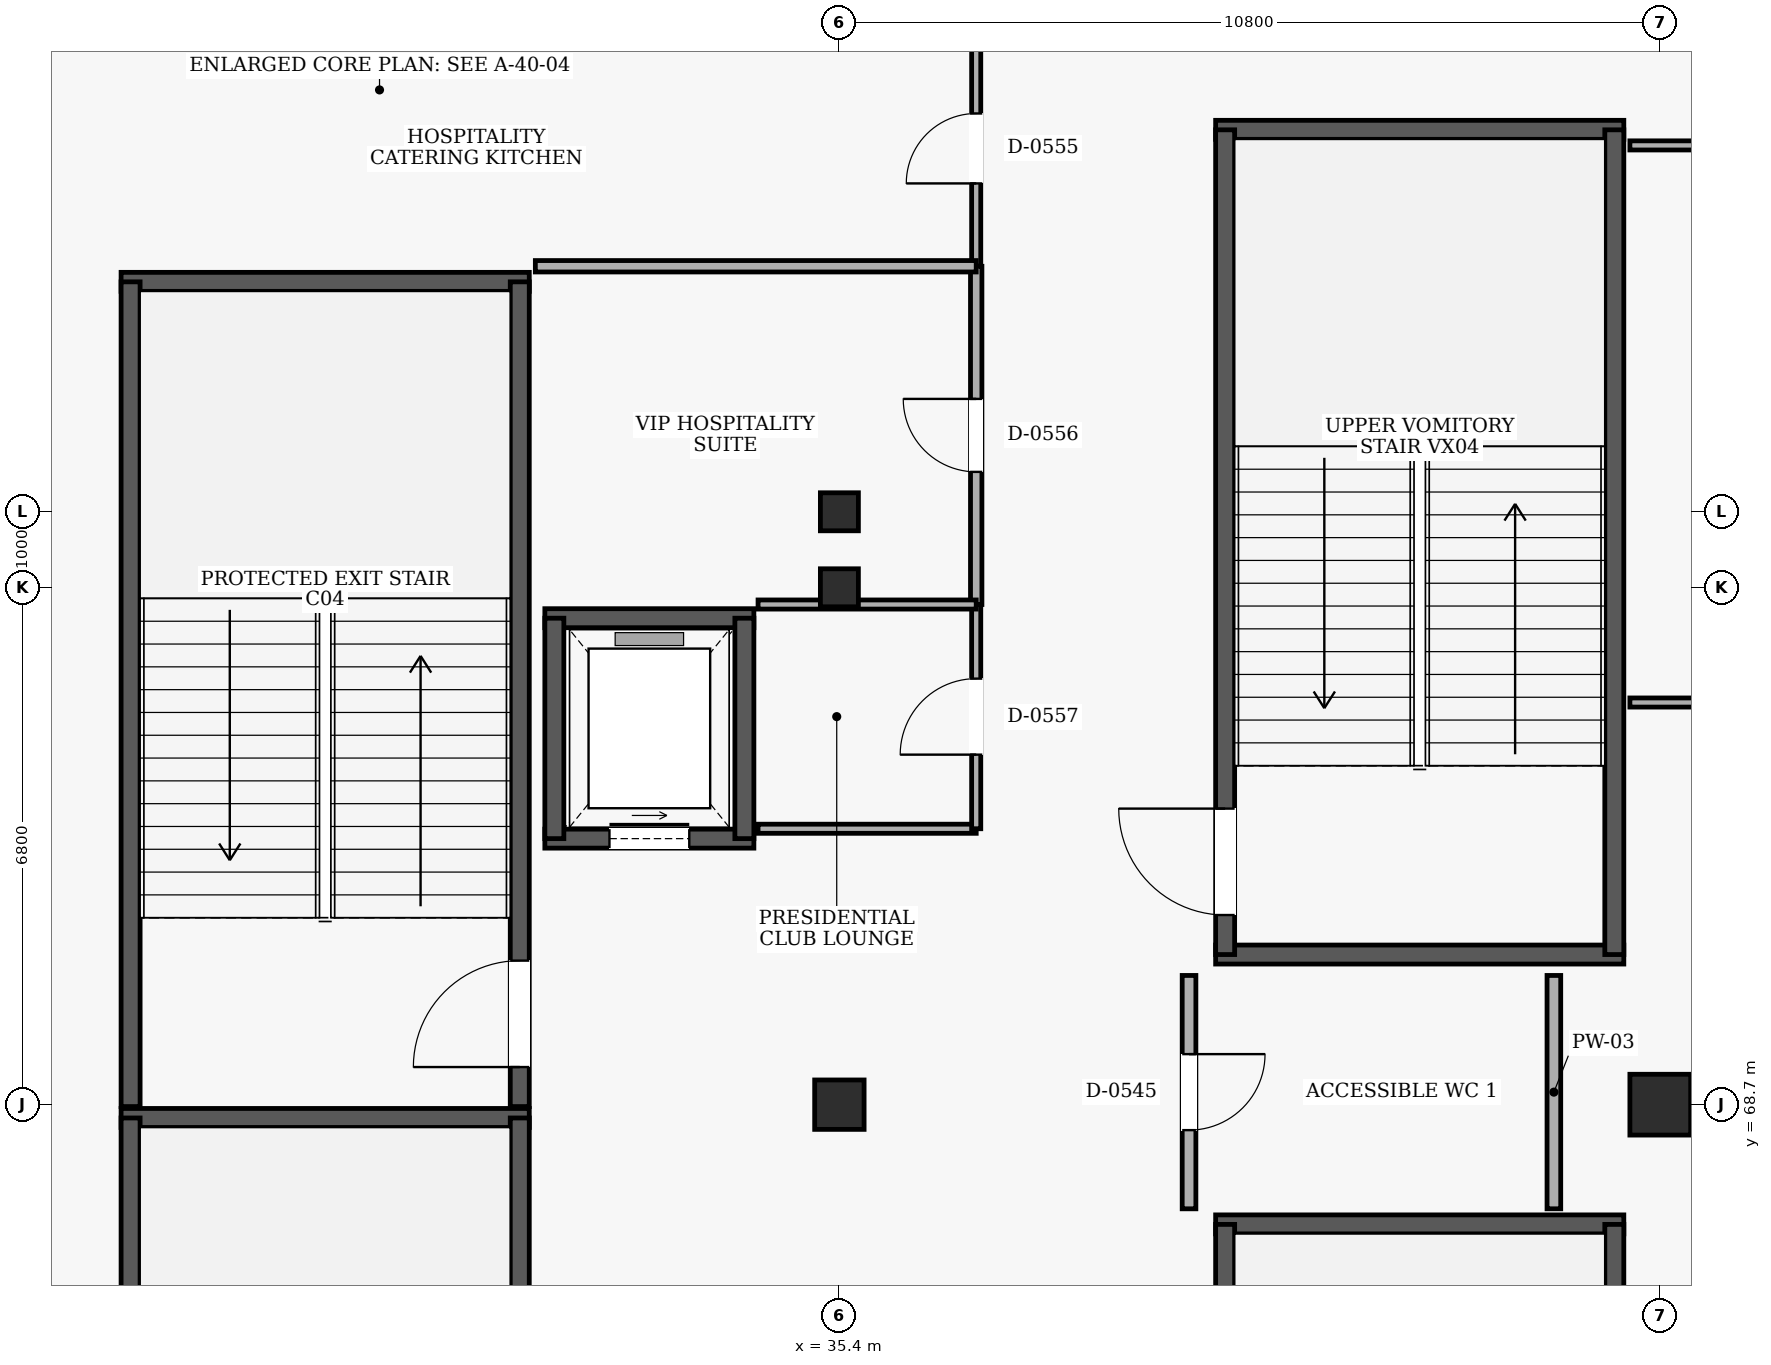
"""IFC4 building model, lengths in metres.
Left out: names, types, materials, properties, quantities, classifications, styles, units other than length and angle.
Written with IfcOpenShell. Run it as: python <this file> out.ifc"""

import sys

from ifc_helpers import new_model, si_unit, direction, frame, frame_2d, origin, origin_2d, place, context, subcontext, project, spatial, rectangle, extrude, element, fill, save


model = new_model("IFC4")
c1 = context("Model", 3, precision=1e-05, world=origin(), true_north=direction((0.0, 1.0)))
c2 = subcontext(c1, "Body", "Model", "MODEL_VIEW")
j1 = project(units=[si_unit("LENGTHUNIT", "METRE"), si_unit("PLANEANGLEUNIT", "RADIAN")], contexts=[c1])
p1 = place(None, origin())
s1 = spatial("IfcSite", under=j1, at=p1, CompositionType="ELEMENT")
p2 = place(p1, origin())
s2 = spatial("IfcBuilding", under=s1, at=p2, CompositionType="ELEMENT")
p3 = place(p2, frame((0.0, 0.0, 10.2)))
s3 = spatial("IfcBuildingStorey", under=s2, at=p3, CompositionType="ELEMENT", Elevation=10.2)
p4 = place(p3, frame((35.4, 68.7, 0.0), z_axis=(0.0, 0.0, 1.0), x_axis=(1.0, 0.0, 0.0)))
e1 = element("IfcColumn", 1, at=p4, inside=s3, PredefinedType="COLUMN", context=c2, shape_type="SweptSolid", body=[
    extrude(rectangle(XDim=0.65, YDim=0.65, at=origin_2d()), origin(), (0.0, 0.0, 1.0), 4.8),
])
for number, where, z_axis, x_axis in (
    (2, (35.4, 75.5, 0.0), (0.0, 0.0, 1.0), (1.0, 0.0, 0.0)),
    (3, (35.4, 76.5, 0.0), (0.0, 0.0, 1.0), (1.0, 0.0, 0.0)),
):
    element("IfcColumn", number, at=place(p3, frame(where, z_axis=z_axis, x_axis=x_axis)), inside=s3, PredefinedType="COLUMN", context=c2, shape_type="SweptSolid", body=[
        extrude(rectangle(XDim=0.5, YDim=0.5, at=origin_2d()), origin(), (0.0, 0.0, 1.0), 4.8),
    ])
p5 = place(p3, frame((46.2, 68.7, 0.0), z_axis=(0.0, 0.0, 1.0), x_axis=(1.0, 0.0, 0.0)))
e4 = element("IfcColumn", 4, at=p5, inside=s3, PredefinedType="COLUMN", context=c2, shape_type="SweptSolid", body=[
    extrude(rectangle(XDim=0.8, YDim=0.8, at=origin_2d()), origin(), (0.0, 0.0, 1.0), 4.8),
])
p6 = place(p3, frame((31.32, 68.525, 0.0), z_axis=(0.0, 0.0, 1.0), x_axis=(-1.0, 0.0, 0.0)))
e5 = element("IfcWall", 5, at=p6, inside=s3, PredefinedType="SHEAR", context=c2, shape_type="SweptSolid", body=[
    extrude(rectangle(XDim=5.37, YDim=0.25, at=frame_2d((2.685, 0.0))), origin(), (0.0, 0.0, 1.0), 4.48),
])
p7 = place(p3, frame((26.075, 57.675, 0.0), z_axis=(0.0, 0.0, 1.0), x_axis=(0.0, 1.0, 0.0)))
e6 = element("IfcWall", 6, at=p7, inside=s3, PredefinedType="SHEAR", context=c2, shape_type="SweptSolid", body=[
    extrude(rectangle(XDim=10.85, YDim=0.25, at=frame_2d((5.425, 0.0))), origin(), (0.0, 0.0, 1.0), 4.48),
])
p8 = place(p3, frame((31.195, 57.675, 0.0), z_axis=(0.0, 0.0, 1.0), x_axis=(0.0, 1.0, 0.0)))
e7 = element("IfcWall", 7, at=p8, inside=s3, PredefinedType="SHEAR", context=c2, shape_type="SweptSolid", body=[
    extrude(rectangle(XDim=10.85, YDim=0.25, at=frame_2d((5.425, 0.0))), origin(), (0.0, 0.0, 1.0), 4.48),
])
p9 = place(p8, frame((0.52, 0.0, 0.0)))
e8 = element("IfcOpeningElement", 8, at=p9, cuts=e7, PredefinedType="OPENING", context=c2, shape_type="SweptSolid", body=[
    extrude(rectangle(XDim=1.4, YDim=2.15, at=frame_2d((0.7, 1.075))), frame((0.0, 0.135, 0.0), z_axis=(0.0, -1.0, 0.0), x_axis=(1.0, 0.0, 0.0)), (0.0, 0.0, 1.0), 0.27),
])
p10 = place(p3, frame((31.32, 79.525, 0.0), z_axis=(0.0, 0.0, 1.0), x_axis=(-1.0, 0.0, 0.0)))
e9 = element("IfcWall", 9, at=p10, inside=s3, PredefinedType="SHEAR", context=c2, shape_type="SweptSolid", body=[
    extrude(rectangle(XDim=5.37, YDim=0.25, at=frame_2d((2.685, 0.0))), origin(), (0.0, 0.0, 1.0), 4.48),
])
p11 = place(p3, frame((26.075, 68.675, 0.0), z_axis=(0.0, 0.0, 1.0), x_axis=(0.0, 1.0, 0.0)))
e10 = element("IfcWall", 10, at=p11, inside=s3, PredefinedType="SHEAR", context=c2, shape_type="SweptSolid", body=[
    extrude(rectangle(XDim=10.85, YDim=0.25, at=frame_2d((5.425, 0.0))), origin(), (0.0, 0.0, 1.0), 4.48),
])
p12 = place(p3, frame((31.195, 68.675, 0.0), z_axis=(0.0, 0.0, 1.0), x_axis=(0.0, 1.0, 0.0)))
e11 = element("IfcWall", 11, at=p12, inside=s3, PredefinedType="SHEAR", context=c2, shape_type="SweptSolid", body=[
    extrude(rectangle(XDim=10.85, YDim=0.25, at=frame_2d((5.425, 0.0))), origin(), (0.0, 0.0, 1.0), 4.48),
])
p13 = place(p12, frame((0.52, 0.0, 0.0)))
e12 = element("IfcOpeningElement", 12, at=p13, cuts=e11, PredefinedType="OPENING", context=c2, shape_type="SweptSolid", body=[
    extrude(rectangle(XDim=1.4, YDim=2.15, at=frame_2d((0.7, 1.075))), frame((0.0, 0.135, 0.0), z_axis=(0.0, -1.0, 0.0), x_axis=(1.0, 0.0, 0.0)), (0.0, 0.0, 1.0), 0.27),
])
p14 = place(p3, frame((45.72, 67.125, 0.0), z_axis=(0.0, 0.0, 1.0), x_axis=(-1.0, 0.0, 0.0)))
e13 = element("IfcWall", 13, at=p14, inside=s3, PredefinedType="SHEAR", context=c2, shape_type="SweptSolid", body=[
    extrude(rectangle(XDim=5.37, YDim=0.25, at=frame_2d((2.685, 0.0))), origin(), (0.0, 0.0, 1.0), 4.48),
])
p15 = place(p3, frame((40.475, 56.275, 0.0), z_axis=(0.0, 0.0, 1.0), x_axis=(0.0, 1.0, 0.0)))
e14 = element("IfcWall", 14, at=p15, inside=s3, PredefinedType="SHEAR", context=c2, shape_type="SweptSolid", body=[
    extrude(rectangle(XDim=10.85, YDim=0.25, at=frame_2d((5.425, 0.0))), origin(), (0.0, 0.0, 1.0), 4.48),
])
p16 = place(p15, frame((0.52, 0.0, 0.0)))
e15 = element("IfcOpeningElement", 15, at=p16, cuts=e14, PredefinedType="OPENING", context=c2, shape_type="SweptSolid", body=[
    extrude(rectangle(XDim=1.4, YDim=2.15, at=frame_2d((0.7, 1.075))), frame((0.0, 0.135, 0.0), z_axis=(0.0, -1.0, 0.0), x_axis=(1.0, 0.0, 0.0)), (0.0, 0.0, 1.0), 0.27),
])
p17 = place(p3, frame((45.595, 56.275, 0.0), z_axis=(0.0, 0.0, 1.0), x_axis=(0.0, 1.0, 0.0)))
e16 = element("IfcWall", 16, at=p17, inside=s3, PredefinedType="SHEAR", context=c2, shape_type="SweptSolid", body=[
    extrude(rectangle(XDim=10.85, YDim=0.25, at=frame_2d((5.425, 0.0))), origin(), (0.0, 0.0, 1.0), 4.48),
])
for number, where, z_axis, x_axis in (
    (17, (40.35, 70.675, 0.0), (0.0, 0.0, 1.0), (1.0, 0.0, 0.0)),
    (18, (45.72, 81.525, 0.0), (0.0, 0.0, 1.0), (-1.0, 0.0, 0.0)),
):
    element("IfcWall", number, at=place(p3, frame(where, z_axis=z_axis, x_axis=x_axis)), inside=s3, PredefinedType="SHEAR", context=c2, shape_type="SweptSolid", body=[
        extrude(rectangle(XDim=5.37, YDim=0.25, at=frame_2d((2.685, 0.0))), origin(), (0.0, 0.0, 1.0), 4.48),
    ])
p18 = place(p3, frame((40.475, 70.675, 0.0), z_axis=(0.0, 0.0, 1.0), x_axis=(0.0, 1.0, 0.0)))
e19 = element("IfcWall", 19, at=p18, inside=s3, PredefinedType="SHEAR", context=c2, shape_type="SweptSolid", body=[
    extrude(rectangle(XDim=10.85, YDim=0.25, at=frame_2d((5.425, 0.0))), origin(), (0.0, 0.0, 1.0), 4.48),
])
p19 = place(p18, frame((0.52, 0.0, 0.0)))
e20 = element("IfcOpeningElement", 20, at=p19, cuts=e19, PredefinedType="OPENING", context=c2, shape_type="SweptSolid", body=[
    extrude(rectangle(XDim=1.4, YDim=2.15, at=frame_2d((0.7, 1.075))), frame((0.0, 0.135, 0.0), z_axis=(0.0, -1.0, 0.0), x_axis=(1.0, 0.0, 0.0)), (0.0, 0.0, 1.0), 0.27),
])
p20 = place(p3, frame((45.595, 70.675, 0.0), z_axis=(0.0, 0.0, 1.0), x_axis=(0.0, 1.0, 0.0)))
e21 = element("IfcWall", 21, at=p20, inside=s3, PredefinedType="SHEAR", context=c2, shape_type="SweptSolid", body=[
    extrude(rectangle(XDim=10.85, YDim=0.25, at=frame_2d((5.425, 0.0))), origin(), (0.0, 0.0, 1.0), 4.48),
])
p21 = place(p3, frame((31.525, 72.2, 0.0), z_axis=(0.0, 0.0, 1.0), x_axis=(1.0, 0.0, 0.0)))
e22 = element("IfcWall", 22, at=p21, inside=s3, PredefinedType="SHEAR", context=c2, shape_type="SweptSolid", body=[
    extrude(rectangle(XDim=2.75, YDim=0.25, at=frame_2d((1.375, 0.0))), origin(), (0.0, 0.0, 1.0), 4.48),
])
p22 = place(p21, frame((0.85, 0.0, 0.0)))
e23 = element("IfcOpeningElement", 23, at=p22, cuts=e22, PredefinedType="OPENING", context=c2, shape_type="SweptSolid", body=[
    extrude(rectangle(XDim=1.05, YDim=2.15, at=frame_2d((0.525, 1.075))), frame((0.0, 0.135, 0.0), z_axis=(0.0, -1.0, 0.0), x_axis=(1.0, 0.0, 0.0)), (0.0, 0.0, 1.0), 0.27),
])
p23 = place(p3, frame((34.275, 75.1, 0.0), z_axis=(0.0, 0.0, 1.0), x_axis=(-1.0, 0.0, 0.0)))
e24 = element("IfcWall", 24, at=p23, inside=s3, PredefinedType="SHEAR", context=c2, shape_type="SweptSolid", body=[
    extrude(rectangle(XDim=2.75, YDim=0.25, at=frame_2d((1.375, 0.0))), origin(), (0.0, 0.0, 1.0), 4.48),
])
for number, where, z_axis, x_axis in (
    (25, (31.65, 75.1, 0.0), (0.0, 0.0, 1.0), (0.0, -1.0, 0.0)),
    (26, (34.15, 72.2, 0.0), (0.0, 0.0, 1.0), (0.0, 1.0, 0.0)),
):
    element("IfcWall", number, at=place(p3, frame(where, z_axis=z_axis, x_axis=x_axis)), inside=s3, PredefinedType="SHEAR", context=c2, shape_type="SweptSolid", body=[
        extrude(rectangle(XDim=2.9, YDim=0.25, at=frame_2d((1.45, 0.0))), origin(), (0.0, 0.0, 1.0), 4.48),
    ])
p24 = place(p3, frame((44.8, 67.33, 0.0), z_axis=(0.0, 0.0, 1.0), x_axis=(0.0, 1.0, 0.0)))
e27 = element("IfcWall", 27, at=p24, inside=s3, PredefinedType="PARTITIONING", context=c2, shape_type="SweptSolid", body=[
    extrude(rectangle(XDim=3.07, YDim=0.18, at=frame_2d((1.535, 0.0))), origin(), (0.0, 0.0, 1.0), 4.48),
])
p25 = place(p3, frame((40.0, 70.4, 0.0), z_axis=(0.0, 0.0, 1.0), x_axis=(0.0, -1.0, 0.0)))
e28 = element("IfcWall", 28, at=p25, inside=s3, PredefinedType="PARTITIONING", context=c2, shape_type="SweptSolid", body=[
    extrude(rectangle(XDim=3.07, YDim=0.18, at=frame_2d((1.535, 0.0))), origin(), (0.0, 0.0, 1.0), 4.48),
])
p26 = place(p25, frame((1.035, 0.0, 0.0)))
e29 = element("IfcOpeningElement", 29, at=p26, cuts=e28, PredefinedType="OPENING", context=c2, shape_type="SweptSolid", body=[
    extrude(rectangle(XDim=1.0, YDim=2.1, at=frame_2d((0.5, 1.05))), frame((0.0, 0.1, 0.0), z_axis=(0.0, -1.0, 0.0), x_axis=(1.0, 0.0, 0.0)), (0.0, 0.0, 1.0), 0.2),
])
p27 = place(p3, frame((37.2, 79.73, 0.0), z_axis=(0.0, 0.0, 1.0), x_axis=(0.0, 1.0, 0.0)))
e30 = element("IfcWall", 30, at=p27, inside=s3, PredefinedType="PARTITIONING", context=c2, shape_type="SweptSolid", body=[
    extrude(rectangle(XDim=3.1, YDim=0.12, at=frame_2d((1.55, 0.0))), origin(), (0.0, 0.0, 1.0), 4.48),
])
p28 = place(p27, frame((1.09, 0.0, 0.0)))
e31 = element("IfcOpeningElement", 31, at=p28, cuts=e30, PredefinedType="OPENING", context=c2, shape_type="SweptSolid", body=[
    extrude(rectangle(XDim=0.92, YDim=2.1, at=frame_2d((0.46, 1.05))), frame((0.0, 0.07, 0.0), z_axis=(0.0, -1.0, 0.0), x_axis=(1.0, 0.0, 0.0)), (0.0, 0.0, 1.0), 0.14),
])
p29 = place(p3, frame((37.2, 75.28, 0.0), z_axis=(0.0, 0.0, 1.0), x_axis=(0.0, 1.0, 0.0)))
e32 = element("IfcWall", 32, at=p29, inside=s3, PredefinedType="PARTITIONING", context=c2, shape_type="SweptSolid", body=[
    extrude(rectangle(XDim=4.45, YDim=0.15, at=frame_2d((2.225, 0.0))), origin(), (0.0, 0.0, 1.0), 4.48),
])
p30 = place(p29, frame((1.745, 0.0, 0.0)))
e33 = element("IfcOpeningElement", 33, at=p30, cuts=e32, PredefinedType="OPENING", context=c2, shape_type="SweptSolid", body=[
    extrude(rectangle(XDim=0.96, YDim=2.1, at=frame_2d((0.48, 1.05))), frame((0.0, 0.085, 0.0), z_axis=(0.0, -1.0, 0.0), x_axis=(1.0, 0.0, 0.0)), (0.0, 0.0, 1.0), 0.17),
])
p31 = place(p3, frame((37.2, 79.73, 0.0), z_axis=(0.0, 0.0, 1.0), x_axis=(-1.0, 0.0, 0.0)))
e34 = element("IfcWall", 34, at=p31, inside=s3, PredefinedType="PARTITIONING", context=c2, shape_type="SweptSolid", body=[
    extrude(rectangle(XDim=5.8, YDim=0.15, at=frame_2d((2.9, 0.0))), origin(), (0.0, 0.0, 1.0), 4.48),
])
p32 = place(p3, frame((34.33, 72.33, 0.0), z_axis=(0.0, 0.0, 1.0), x_axis=(1.0, 0.0, 0.0)))
e35 = element("IfcWall", 35, at=p32, inside=s3, PredefinedType="PARTITIONING", context=c2, shape_type="SweptSolid", body=[
    extrude(rectangle(XDim=2.87, YDim=0.12, at=frame_2d((1.435, 0.0))), origin(), (0.0, 0.0, 1.0), 4.48),
])
p33 = place(p3, frame((37.2, 72.33, 0.0), z_axis=(0.0, 0.0, 1.0), x_axis=(0.0, 1.0, 0.0)))
e36 = element("IfcWall", 36, at=p33, inside=s3, PredefinedType="PARTITIONING", context=c2, shape_type="SweptSolid", body=[
    extrude(rectangle(XDim=2.95, YDim=0.12, at=frame_2d((1.475, 0.0))), origin(), (0.0, 0.0, 1.0), 4.48),
])
p34 = place(p33, frame((0.975, 0.0, 0.0)))
e37 = element("IfcOpeningElement", 37, at=p34, cuts=e36, PredefinedType="OPENING", context=c2, shape_type="SweptSolid", body=[
    extrude(rectangle(XDim=1.0, YDim=2.1, at=frame_2d((0.5, 1.05))), frame((0.0, 0.07, 0.0), z_axis=(0.0, -1.0, 0.0), x_axis=(1.0, 0.0, 0.0)), (0.0, 0.0, 1.0), 0.14),
])
p35 = place(p3, frame((37.2, 75.28, 0.0), z_axis=(0.0, 0.0, 1.0), x_axis=(-1.0, 0.0, 0.0)))
e38 = element("IfcWall", 38, at=p35, inside=s3, PredefinedType="PARTITIONING", context=c2, shape_type="SweptSolid", body=[
    extrude(rectangle(XDim=2.87, YDim=0.12, at=frame_2d((1.435, 0.0))), origin(), (0.0, 0.0, 1.0), 4.48),
])
p36 = place(p3, frame((45.8, 73.991, 0.0), z_axis=(0.0, 0.0, 1.0), x_axis=(1.0, 0.0, 0.0)))
e39 = element("IfcWall", 39, at=p36, inside=s3, PredefinedType="PARTITIONING", context=c2, shape_type="SweptSolid", body=[
    extrude(rectangle(XDim=14.8, YDim=0.12, at=frame_2d((7.4, 0.0))), origin(), (0.0, 0.0, 1.0), 4.48),
])
p37 = place(p3, frame((60.6, 81.32, 0.0), z_axis=(0.0, 0.0, 1.0), x_axis=(-1.0, 0.0, 0.0)))
e40 = element("IfcWall", 40, at=p37, inside=s3, PredefinedType="PARTITIONING", context=c2, shape_type="SweptSolid", body=[
    extrude(rectangle(XDim=14.8, YDim=0.12, at=frame_2d((7.4, 0.0))), origin(), (0.0, 0.0, 1.0), 4.48),
])
p38 = place(p37, frame((7.878, 0.0, 0.0)))
e41 = element("IfcOpeningElement", 41, at=p38, cuts=e40, PredefinedType="OPENING", context=c2, shape_type="SweptSolid", body=[
    extrude(rectangle(XDim=1.12, YDim=2.15, at=frame_2d((0.56, 1.075))), frame((0.0, 0.07, 0.0), z_axis=(0.0, -1.0, 0.0), x_axis=(1.0, 0.0, 0.0)), (0.0, 0.0, 1.0), 0.14),
])
p39 = place(p13, origin())
e42 = element("IfcDoor", 42, at=p39, inside=s3, OperationType="SINGLE_SWING_LEFT", PredefinedType="DOOR", context=c2, shape_type="SweptSolid", body=[
    extrude(rectangle(XDim=1.4, YDim=2.15, at=frame_2d((0.7, 1.075))), frame((0.0, 0.025, 0.0), z_axis=(0.0, -1.0, 0.0), x_axis=(1.0, 0.0, 0.0)), (0.0, 0.0, 1.0), 0.05),
])
fill(e12, e42)
p40 = place(p19, frame((1.4, 0.0, 0.0), z_axis=(0.0, 0.0, 1.0), x_axis=(-1.0, 0.0, 0.0)))
e43 = element("IfcDoor", 43, at=p40, inside=s3, OperationType="SINGLE_SWING_LEFT", PredefinedType="DOOR", context=c2, shape_type="SweptSolid", body=[
    extrude(rectangle(XDim=1.4, YDim=2.15, at=frame_2d((0.7, 1.075))), frame((0.0, 0.025, 0.0), z_axis=(0.0, -1.0, 0.0), x_axis=(1.0, 0.0, 0.0)), (0.0, 0.0, 1.0), 0.05),
])
fill(e20, e43)
p41 = place(p22, origin())
e44 = element("IfcDoor", 44, at=p41, inside=s3, OperationType="SLIDING_TO_LEFT", PredefinedType="DOOR", context=c2, shape_type="SweptSolid", body=[
    extrude(rectangle(XDim=1.05, YDim=2.15, at=frame_2d((0.525, 1.075))), frame((0.0, 0.025, 0.0), z_axis=(0.0, -1.0, 0.0), x_axis=(1.0, 0.0, 0.0)), (0.0, 0.0, 1.0), 0.05),
])
fill(e23, e44)
p42 = place(p26, origin())
e45 = element("IfcDoor", 45, at=p42, inside=s3, OperationType="SINGLE_SWING_LEFT", PredefinedType="DOOR", context=c2, shape_type="SweptSolid", body=[
    extrude(rectangle(XDim=1.0, YDim=2.1, at=frame_2d((0.5, 1.05))), frame((0.0, 0.025, 0.0), z_axis=(0.0, -1.0, 0.0), x_axis=(1.0, 0.0, 0.0)), (0.0, 0.0, 1.0), 0.05),
])
fill(e29, e45)
p43 = place(p28, origin())
e46 = element("IfcDoor", 46, at=p43, inside=s3, OperationType="SINGLE_SWING_LEFT", PredefinedType="DOOR", context=c2, shape_type="SweptSolid", body=[
    extrude(rectangle(XDim=0.92, YDim=2.1, at=frame_2d((0.46, 1.05))), frame((0.0, 0.025, 0.0), z_axis=(0.0, -1.0, 0.0), x_axis=(1.0, 0.0, 0.0)), (0.0, 0.0, 1.0), 0.05),
])
fill(e31, e46)
p44 = place(p30, origin())
e47 = element("IfcDoor", 47, at=p44, inside=s3, OperationType="SINGLE_SWING_RIGHT", PredefinedType="DOOR", context=c2, shape_type="SweptSolid", body=[
    extrude(rectangle(XDim=0.96, YDim=2.1, at=frame_2d((0.48, 1.05))), frame((0.0, 0.025, 0.0), z_axis=(0.0, -1.0, 0.0), x_axis=(1.0, 0.0, 0.0)), (0.0, 0.0, 1.0), 0.05),
])
fill(e33, e47)
p45 = place(p34, origin())
e48 = element("IfcDoor", 48, at=p45, inside=s3, OperationType="SINGLE_SWING_LEFT", PredefinedType="DOOR", context=c2, shape_type="SweptSolid", body=[
    extrude(rectangle(XDim=1.0, YDim=2.1, at=frame_2d((0.5, 1.05))), frame((0.0, 0.025, 0.0), z_axis=(0.0, -1.0, 0.0), x_axis=(1.0, 0.0, 0.0)), (0.0, 0.0, 1.0), 0.05),
])
fill(e37, e48)
save(model, sys.argv[1])
